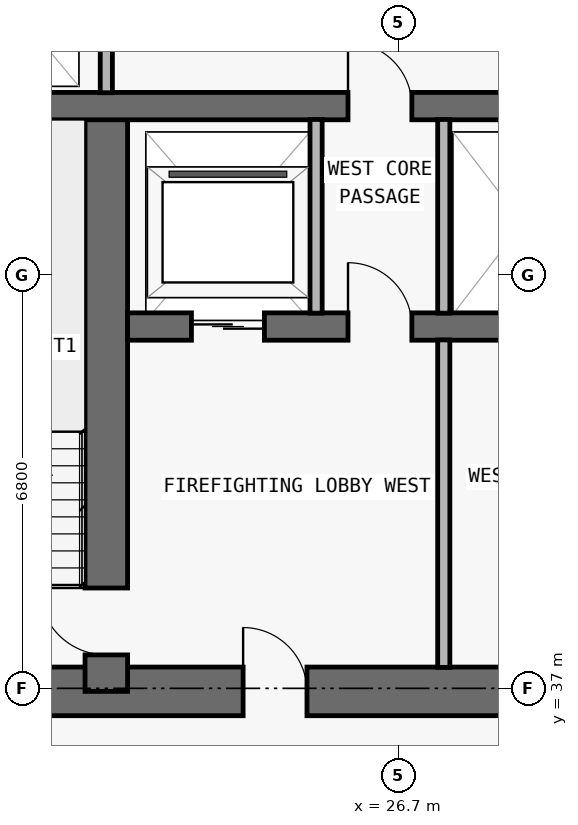
"""IFC4 building model, lengths in metres.
Left out: names, types, materials, properties, quantities, classifications, styles, units other than length and angle.
Written with IfcOpenShell. Run it as: python <this file> out.ifc"""

import sys

from ifc_helpers import new_model, si_unit, direction, frame, frame_2d, origin, place, context, subcontext, project, spatial, rectangle, extrude, element, fill, save


model = new_model("IFC4")
c1 = context("Model", 3, precision=1e-05, world=origin(), true_north=direction((0.0, 1.0)))
c2 = subcontext(c1, "Body", "Model", "MODEL_VIEW")
j1 = project(units=[si_unit("LENGTHUNIT", "METRE"), si_unit("PLANEANGLEUNIT", "RADIAN")], contexts=[c1])
p1 = place(None, origin())
s1 = spatial("IfcSite", under=j1, at=p1, CompositionType="ELEMENT")
p2 = place(p1, origin())
s2 = spatial("IfcBuilding", under=s1, at=p2, CompositionType="ELEMENT")
p3 = place(p2, frame((0.0, 0.0, 148.8)))
s3 = spatial("IfcBuildingStorey", under=s2, at=p3, CompositionType="ELEMENT", Elevation=148.8)
p4 = place(p3, frame((17.85, 36.95, 0.0), z_axis=(0.0, 0.0, 1.0), x_axis=(1.0, 0.0, 0.0)))
e1 = element("IfcWall", 1, at=p4, inside=s3, PredefinedType="SHEAR", context=c2, shape_type="SweptSolid", body=[
    extrude(rectangle(XDim=42.1, YDim=0.8, at=frame_2d((21.05, 0.0))), origin(), (0.0, 0.0, 1.0), 3.0),
])
p5 = place(p4, frame((14.45, 0.0, 0.0)))
e2 = element("IfcOpeningElement", 2, at=p5, cuts=e1, PredefinedType="OPENING", context=c2, shape_type="SweptSolid", body=[
    extrude(rectangle(XDim=1.1, YDim=2.15, at=frame_2d((0.55, 1.075))), frame((0.0, 0.41, 0.0), z_axis=(0.0, -1.0, 0.0), x_axis=(1.0, 0.0, 0.0)), (0.0, 0.0, 1.0), 0.82),
])
p6 = place(p4, frame((6.3, 0.0, 0.0)))
e3 = element("IfcOpeningElement", 3, at=p6, cuts=e1, PredefinedType="OPENING", context=c2, shape_type="SweptSolid", body=[
    extrude(rectangle(XDim=1.05, YDim=2.15, at=frame_2d((0.525, 1.075))), frame((0.0, 0.41, 0.0), z_axis=(0.0, -1.0, 0.0), x_axis=(1.0, 0.0, 0.0)), (0.0, 0.0, 1.0), 0.82),
])
p7 = place(p4, frame((34.8, 0.0, 0.0)))
e4 = element("IfcOpeningElement", 4, at=p7, cuts=e1, PredefinedType="OPENING", context=c2, shape_type="SweptSolid", body=[
    extrude(rectangle(XDim=1.05, YDim=2.15, at=frame_2d((0.525, 1.075))), frame((0.0, 0.41, 0.0), z_axis=(0.0, -1.0, 0.0), x_axis=(1.0, 0.0, 0.0)), (0.0, 0.0, 1.0), 0.82),
])
p8 = place(p4, frame((10.913, 0.0, 0.0)))
e5 = element("IfcOpeningElement", 5, at=p8, cuts=e1, PredefinedType="OPENING", context=c2, shape_type="SweptSolid", body=[
    extrude(rectangle(XDim=1.05, YDim=2.15, at=frame_2d((0.525, 1.075))), frame((0.0, 0.41, 0.0), z_axis=(0.0, -1.0, 0.0), x_axis=(1.0, 0.0, 0.0)), (0.0, 0.0, 1.0), 0.82),
])
p9 = place(p4, frame((24.15, 0.0, 0.0)))
e6 = element("IfcOpeningElement", 6, at=p9, cuts=e1, PredefinedType="OPENING", context=c2, shape_type="SweptSolid", body=[
    extrude(rectangle(XDim=1.05, YDim=2.15, at=frame_2d((0.525, 1.075))), frame((0.0, 0.41, 0.0), z_axis=(0.0, -1.0, 0.0), x_axis=(1.0, 0.0, 0.0)), (0.0, 0.0, 1.0), 0.82),
])
p10 = place(p3, frame((21.9, 36.95, 0.0), z_axis=(0.0, 0.0, 1.0), x_axis=(0.0, 1.0, 0.0)))
e7 = element("IfcWall", 7, at=p10, inside=s3, PredefinedType="SHEAR", context=c2, shape_type="SweptSolid", body=[
    extrude(rectangle(XDim=9.625, YDim=0.7, at=frame_2d((4.812, 0.0))), origin(), (0.0, 0.0, 1.0), 3.0),
])
p11 = place(p10, frame((0.6, 0.0, 0.0)))
e8 = element("IfcOpeningElement", 8, at=p11, cuts=e7, PredefinedType="OPENING", context=c2, shape_type="SweptSolid", body=[
    extrude(rectangle(XDim=1.1, YDim=2.15, at=frame_2d((0.55, 1.075))), frame((0.0, 0.36, 0.0), z_axis=(0.0, -1.0, 0.0), x_axis=(1.0, 0.0, 0.0)), (0.0, 0.0, 1.0), 0.72),
])
p12 = place(p3, frame((22.25, 42.95, 0.0), z_axis=(0.0, 0.0, 1.0), x_axis=(1.0, 0.0, 0.0)))
e9 = element("IfcWall", 9, at=p12, inside=s3, PredefinedType="SHEAR", context=c2, shape_type="SweptSolid", body=[
    extrude(rectangle(XDim=33.3, YDim=0.45, at=frame_2d((16.65, 0.0))), origin(), (0.0, 0.0, 1.0), 3.0),
])
p13 = place(p12, frame((1.05, 0.0, 0.0)))
e10 = element("IfcOpeningElement", 10, at=p13, cuts=e9, PredefinedType="OPENING", context=c2, shape_type="SweptSolid", body=[
    extrude(rectangle(XDim=1.2, YDim=2.2, at=frame_2d((0.6, 1.1))), frame((0.0, 0.235, 0.0), z_axis=(0.0, -1.0, 0.0), x_axis=(1.0, 0.0, 0.0)), (0.0, 0.0, 1.0), 0.47),
])
p14 = place(p12, frame((31.05, 0.0, 0.0)))
e11 = element("IfcOpeningElement", 11, at=p14, cuts=e9, PredefinedType="OPENING", context=c2, shape_type="SweptSolid", body=[
    extrude(rectangle(XDim=1.2, YDim=2.2, at=frame_2d((0.6, 1.1))), frame((0.0, 0.235, 0.0), z_axis=(0.0, -1.0, 0.0), x_axis=(1.0, 0.0, 0.0)), (0.0, 0.0, 1.0), 0.47),
])
p15 = place(p12, frame((21.4, 0.0, 0.0)))
e12 = element("IfcOpeningElement", 12, at=p15, cuts=e9, PredefinedType="OPENING", context=c2, shape_type="SweptSolid", body=[
    extrude(rectangle(XDim=1.1, YDim=2.2, at=frame_2d((0.55, 1.1))), frame((0.0, 0.235, 0.0), z_axis=(0.0, -1.0, 0.0), x_axis=(1.0, 0.0, 0.0)), (0.0, 0.0, 1.0), 0.47),
])
p16 = place(p12, frame((24.0, 0.0, 0.0)))
e13 = element("IfcOpeningElement", 13, at=p16, cuts=e9, PredefinedType="OPENING", context=c2, shape_type="SweptSolid", body=[
    extrude(rectangle(XDim=1.1, YDim=2.2, at=frame_2d((0.55, 1.1))), frame((0.0, 0.235, 0.0), z_axis=(0.0, -1.0, 0.0), x_axis=(1.0, 0.0, 0.0)), (0.0, 0.0, 1.0), 0.47),
])
p17 = place(p12, frame((3.625, 0.0, 0.0)))
e14 = element("IfcOpeningElement", 14, at=p17, cuts=e9, PredefinedType="OPENING", context=c2, shape_type="SweptSolid", body=[
    extrude(rectangle(XDim=1.05, YDim=2.15, at=frame_2d((0.525, 1.075))), frame((0.0, 0.235, 0.0), z_axis=(0.0, -1.0, 0.0), x_axis=(1.0, 0.0, 0.0)), (0.0, 0.0, 1.0), 0.47),
])
p18 = place(p12, frame((28.675, 0.0, 0.0)))
e15 = element("IfcOpeningElement", 15, at=p18, cuts=e9, PredefinedType="OPENING", context=c2, shape_type="SweptSolid", body=[
    extrude(rectangle(XDim=1.05, YDim=2.15, at=frame_2d((0.525, 1.075))), frame((0.0, 0.235, 0.0), z_axis=(0.0, -1.0, 0.0), x_axis=(1.0, 0.0, 0.0)), (0.0, 0.0, 1.0), 0.47),
])
p19 = place(p12, frame((13.925, 0.0, 0.0)))
e16 = element("IfcOpeningElement", 16, at=p19, cuts=e9, PredefinedType="OPENING", context=c2, shape_type="SweptSolid", body=[
    extrude(rectangle(XDim=1.0, YDim=2.2, at=frame_2d((0.5, 1.1))), frame((0.0, 0.235, 0.0), z_axis=(0.0, -1.0, 0.0), x_axis=(1.0, 0.0, 0.0)), (0.0, 0.0, 1.0), 0.47),
])
p20 = place(p12, frame((18.05, 0.0, 0.0)))
e17 = element("IfcOpeningElement", 17, at=p20, cuts=e9, PredefinedType="OPENING", context=c2, shape_type="SweptSolid", body=[
    extrude(rectangle(XDim=1.0, YDim=2.2, at=frame_2d((0.5, 1.1))), frame((0.0, 0.235, 0.0), z_axis=(0.0, -1.0, 0.0), x_axis=(1.0, 0.0, 0.0)), (0.0, 0.0, 1.0), 0.47),
])
p21 = place(p3, frame((18.25, 46.575, 0.0), z_axis=(0.0, 0.0, 1.0), x_axis=(1.0, 0.0, 0.0)))
e18 = element("IfcWall", 18, at=p21, inside=s3, PredefinedType="SHEAR", context=c2, shape_type="SweptSolid", body=[
    extrude(rectangle(XDim=41.3, YDim=0.45, at=frame_2d((20.65, 0.0))), origin(), (0.0, 0.0, 1.0), 3.0),
])
p22 = place(p21, frame((7.625, 0.0, 0.0)))
e19 = element("IfcOpeningElement", 19, at=p22, cuts=e18, PredefinedType="OPENING", context=c2, shape_type="SweptSolid", body=[
    extrude(rectangle(XDim=1.05, YDim=2.15, at=frame_2d((0.525, 1.075))), frame((0.0, 0.235, 0.0), z_axis=(0.0, -1.0, 0.0), x_axis=(1.0, 0.0, 0.0)), (0.0, 0.0, 1.0), 0.47),
])
p23 = place(p21, frame((32.675, 0.0, 0.0)))
e20 = element("IfcOpeningElement", 20, at=p23, cuts=e18, PredefinedType="OPENING", context=c2, shape_type="SweptSolid", body=[
    extrude(rectangle(XDim=1.05, YDim=2.15, at=frame_2d((0.525, 1.075))), frame((0.0, 0.235, 0.0), z_axis=(0.0, -1.0, 0.0), x_axis=(1.0, 0.0, 0.0)), (0.0, 0.0, 1.0), 0.47),
])
p24 = place(p3, frame((21.9, 46.795, 0.0), z_axis=(0.0, 0.0, 1.0), x_axis=(0.0, 1.0, 0.0)))
e21 = element("IfcWall", 21, at=p24, inside=s3, PredefinedType="PARTITIONING", context=c2, shape_type="SweptSolid", body=[
    extrude(rectangle(XDim=3.16, YDim=0.2, at=frame_2d((1.58, 0.0))), origin(), (0.0, 0.0, 1.0), 3.0),
])
p25 = place(p3, frame((25.35, 43.17, 0.0), z_axis=(0.0, 0.0, 1.0), x_axis=(0.0, 1.0, 0.0)))
e22 = element("IfcWall", 22, at=p25, inside=s3, PredefinedType="PARTITIONING", context=c2, shape_type="SweptSolid", body=[
    extrude(rectangle(XDim=3.185, YDim=0.2, at=frame_2d((1.593, 0.0))), origin(), (0.0, 0.0, 1.0), 3.0),
])
p26 = place(p3, frame((27.45, 37.345, 0.0), z_axis=(0.0, 0.0, 1.0), x_axis=(0.0, 1.0, 0.0)))
e23 = element("IfcWall", 23, at=p26, inside=s3, PredefinedType="PARTITIONING", context=c2, shape_type="SweptSolid", body=[
    extrude(rectangle(XDim=5.385, YDim=0.2, at=frame_2d((2.692, 0.0))), origin(), (0.0, 0.0, 1.0), 3.0),
])
p27 = place(p3, frame((27.45, 43.17, 0.0), z_axis=(0.0, 0.0, 1.0), x_axis=(0.0, 1.0, 0.0)))
e24 = element("IfcWall", 24, at=p27, inside=s3, PredefinedType="PARTITIONING", context=c2, shape_type="SweptSolid", body=[
    extrude(rectangle(XDim=3.185, YDim=0.2, at=frame_2d((1.593, 0.0))), origin(), (0.0, 0.0, 1.0), 3.0),
])
p28 = place(p13, origin())
e25 = element("IfcDoor", 25, at=p28, inside=s3, OperationType="DOUBLE_DOOR_SLIDING", PredefinedType="DOOR", context=c2, shape_type="SweptSolid", body=[
    extrude(rectangle(XDim=1.2, YDim=2.2, at=frame_2d((0.6, 1.1))), frame((0.0, 0.025, 0.0), z_axis=(0.0, -1.0, 0.0), x_axis=(1.0, 0.0, 0.0)), (0.0, 0.0, 1.0), 0.05),
])
fill(e10, e25)
p29 = place(p6, origin())
e26 = element("IfcDoor", 26, at=p29, inside=s3, OperationType="SINGLE_SWING_LEFT", PredefinedType="DOOR", context=c2, shape_type="SweptSolid", body=[
    extrude(rectangle(XDim=1.05, YDim=2.15, at=frame_2d((0.525, 1.075))), frame((0.0, 0.025, 0.0), z_axis=(0.0, -1.0, 0.0), x_axis=(1.0, 0.0, 0.0)), (0.0, 0.0, 1.0), 0.05),
])
fill(e3, e26)
p30 = place(p11, origin())
e27 = element("IfcDoor", 27, at=p30, inside=s3, OperationType="SINGLE_SWING_RIGHT", PredefinedType="DOOR", context=c2, shape_type="SweptSolid", body=[
    extrude(rectangle(XDim=1.1, YDim=2.15, at=frame_2d((0.55, 1.075))), frame((0.0, 0.025, 0.0), z_axis=(0.0, -1.0, 0.0), x_axis=(1.0, 0.0, 0.0)), (0.0, 0.0, 1.0), 0.05),
])
fill(e8, e27)
p31 = place(p17, origin())
e28 = element("IfcDoor", 28, at=p31, inside=s3, OperationType="SINGLE_SWING_LEFT", PredefinedType="DOOR", context=c2, shape_type="SweptSolid", body=[
    extrude(rectangle(XDim=1.05, YDim=2.15, at=frame_2d((0.525, 1.075))), frame((0.0, 0.025, 0.0), z_axis=(0.0, -1.0, 0.0), x_axis=(1.0, 0.0, 0.0)), (0.0, 0.0, 1.0), 0.05),
])
fill(e14, e28)
p32 = place(p22, origin())
e29 = element("IfcDoor", 29, at=p32, inside=s3, OperationType="SINGLE_SWING_LEFT", PredefinedType="DOOR", context=c2, shape_type="SweptSolid", body=[
    extrude(rectangle(XDim=1.05, YDim=2.15, at=frame_2d((0.525, 1.075))), frame((0.0, 0.025, 0.0), z_axis=(0.0, -1.0, 0.0), x_axis=(1.0, 0.0, 0.0)), (0.0, 0.0, 1.0), 0.05),
])
fill(e19, e29)
save(model, sys.argv[1])
